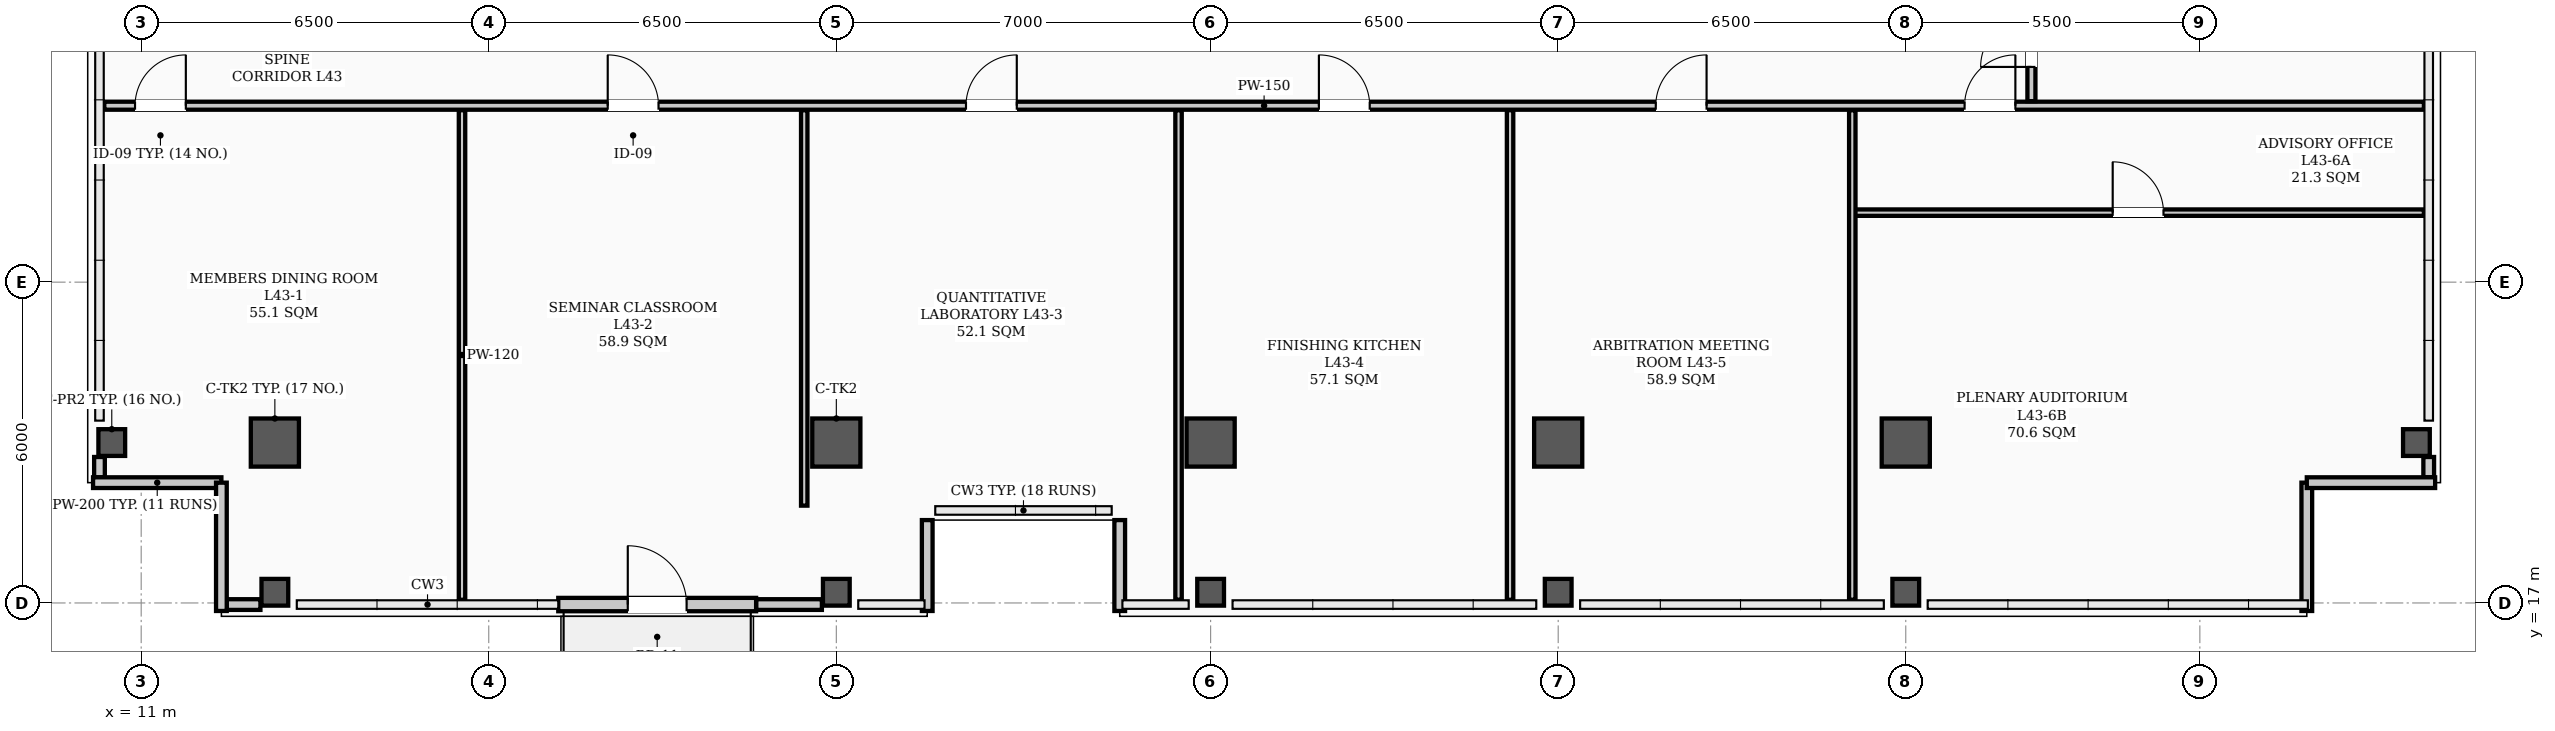
"""IFC4 building model, lengths in metres.
Left out: names, types, materials, properties, quantities, classifications, styles, units other than length and angle.
Written with IfcOpenShell. Run it as: python <this file> out.ifc"""

import sys

from ifc_helpers import new_model, si_unit, direction, frame, frame_2d, origin, origin_2d, place, context, subcontext, project, spatial, rectangle, hollow_rectangle, extrude, element, fill, save


model = new_model("IFC4")
c1 = context("Model", 3, precision=1e-05, world=origin(), true_north=direction((0.0, 1.0)))
c2 = subcontext(c1, "Body", "Model", "MODEL_VIEW")
j1 = project(units=[si_unit("LENGTHUNIT", "METRE"), si_unit("PLANEANGLEUNIT", "RADIAN")], contexts=[c1])
p1 = place(None, origin())
s1 = spatial("IfcSite", under=j1, at=p1, CompositionType="ELEMENT")
p2 = place(p1, origin())
s2 = spatial("IfcBuilding", under=s1, at=p2, CompositionType="ELEMENT")
p3 = place(p2, frame((0.0, 0.0, 173.4)))
s3 = spatial("IfcBuildingStorey", under=s2, at=p3, CompositionType="ELEMENT", Elevation=173.4)
for number, where, z_axis, x_axis in (
    (1, (13.5, 20.0, 0.0), (0.0, 0.0, 1.0), (1.0, 0.0, 0.0)),
    (2, (24.0, 20.0, 0.0), (0.0, 0.0, 1.0), (1.0, 0.0, 0.0)),
    (3, (31.0, 20.0, 0.0), (0.0, 0.0, 1.0), (1.0, 0.0, 0.0)),
    (4, (37.5, 20.0, 0.0), (0.0, 0.0, 1.0), (1.0, 0.0, 0.0)),
    (5, (44.0, 20.0, 0.0), (0.0, 0.0, 1.0), (1.0, 0.0, 0.0)),
):
    element("IfcColumn", number, at=place(p3, frame(where, z_axis=z_axis, x_axis=x_axis)), inside=s3, PredefinedType="COLUMN", context=c2, shape_type="SweptSolid", body=[
        extrude(hollow_rectangle(XDim=0.9, YDim=0.9, WallThickness=0.035, InnerFilletRadius=0.017, OuterFilletRadius=0.052, at=origin_2d()), origin(), (0.0, 0.0, 1.0), 3.9),
    ])
for number, where, z_axis, x_axis in (
    (6, (10.45, 20.0, 0.0), (0.0, 0.0, 1.0), (1.0, 0.0, 0.0)),
    (7, (13.5, 17.2, 0.0), (0.0, 0.0, 1.0), (1.0, 0.0, 0.0)),
    (8, (24.0, 17.2, 0.0), (0.0, 0.0, 1.0), (1.0, 0.0, 0.0)),
    (9, (31.0, 17.2, 0.0), (0.0, 0.0, 1.0), (1.0, 0.0, 0.0)),
    (10, (37.5, 17.2, 0.0), (0.0, 0.0, 1.0), (1.0, 0.0, 0.0)),
    (11, (44.0, 17.2, 0.0), (0.0, 0.0, 1.0), (1.0, 0.0, 0.0)),
    (12, (53.55, 20.0, 0.0), (0.0, 0.0, 1.0), (1.0, 0.0, 0.0)),
):
    element("IfcColumn", number, at=place(p3, frame(where, z_axis=z_axis, x_axis=x_axis)), inside=s3, PredefinedType="COLUMN", context=c2, shape_type="SweptSolid", body=[
        extrude(hollow_rectangle(XDim=0.5, YDim=0.5, WallThickness=0.024, InnerFilletRadius=0.012, OuterFilletRadius=0.036, at=origin_2d()), origin(), (0.0, 0.0, 1.0), 3.9),
    ])
for number, where, z_axis, x_axis in (
    (13, (10.22, 19.35, 0.0), (0.0, 0.0, 1.0), (0.0, 1.0, 0.0)),
    (14, (53.78, 19.35, 0.0), (0.0, 0.0, 1.0), (0.0, 1.0, 0.0)),
):
    element("IfcWall", number, at=place(p3, frame(where, z_axis=z_axis, x_axis=x_axis)), inside=s3, PredefinedType="PARAPET", context=c2, shape_type="SweptSolid", body=[
        extrude(rectangle(XDim=0.38, YDim=0.2, at=frame_2d((0.19, 0.0))), origin(), (0.0, 0.0, 1.0), 1.2),
    ])
p4 = place(p3, frame((12.6, 16.97, 0.0), z_axis=(0.0, 0.0, 1.0), x_axis=(1.0, 0.0, 0.0)))
e15 = element("IfcWall", 15, at=p4, inside=s3, PredefinedType="PARAPET", context=c2, shape_type="SweptSolid", body=[
    extrude(rectangle(XDim=0.63, YDim=0.2, at=frame_2d((0.315, 0.0))), origin(), (0.0, 0.0, 1.0), 1.2),
])
p5 = place(p3, frame((22.5, 16.97, 0.0), z_axis=(0.0, 0.0, 1.0), x_axis=(1.0, 0.0, 0.0)))
e16 = element("IfcWall", 16, at=p5, inside=s3, PredefinedType="PARAPET", context=c2, shape_type="SweptSolid", body=[
    extrude(rectangle(XDim=1.23, YDim=0.2, at=frame_2d((0.615, 0.0))), origin(), (0.0, 0.0, 1.0), 1.2),
])
for number, where, z_axis, x_axis in (
    (17, (10.1, 19.25, 0.0), (0.0, 0.0, 1.0), (1.0, 0.0, 0.0)),
    (18, (12.5, 19.25, 0.0), (0.0, 0.0, 1.0), (0.0, -1.0, 0.0)),
    (19, (51.5, 16.85, 0.0), (0.0, 0.0, 1.0), (0.0, 1.0, 0.0)),
    (20, (51.5, 19.25, 0.0), (0.0, 0.0, 1.0), (1.0, 0.0, 0.0)),
):
    element("IfcWall", number, at=place(p3, frame(where, z_axis=z_axis, x_axis=x_axis)), inside=s3, PredefinedType="PARAPET", context=c2, shape_type="SweptSolid", body=[
        extrude(rectangle(XDim=2.4, YDim=0.2, at=frame_2d((1.2, 0.0))), origin(), (0.0, 0.0, 1.0), 1.2),
    ])
for number, where, z_axis, x_axis in (
    (21, (25.7, 16.85, 0.0), (0.0, 0.0, 1.0), (0.0, 1.0, 0.0)),
    (22, (29.3, 18.55, 0.0), (0.0, 0.0, 1.0), (0.0, -1.0, 0.0)),
):
    element("IfcWall", number, at=place(p3, frame(where, z_axis=z_axis, x_axis=x_axis)), inside=s3, PredefinedType="PARAPET", context=c2, shape_type="SweptSolid", body=[
        extrude(rectangle(XDim=1.7, YDim=0.2, at=frame_2d((0.85, 0.0))), origin(), (0.0, 0.0, 1.0), 1.2),
    ])
p6 = place(p3, frame((18.8, 16.97, 0.0), z_axis=(0.0, 0.0, 1.0), x_axis=(1.0, 0.0, 0.0)))
e23 = element("IfcWall", 23, at=p6, inside=s3, PredefinedType="STANDARD", context=c2, shape_type="SweptSolid", body=[
    extrude(rectangle(XDim=3.7, YDim=0.25, at=frame_2d((1.85, 0.0))), origin(), (0.0, 0.0, 1.0), 3.18),
])
p7 = place(p6, frame((1.3, 0.0, 0.0)))
e24 = element("IfcOpeningElement", 24, at=p7, cuts=e23, PredefinedType="OPENING", context=c2, shape_type="SweptSolid", body=[
    extrude(rectangle(XDim=1.1, YDim=2.2, at=frame_2d((0.55, 1.1))), frame((0.0, 0.135, 0.0), z_axis=(0.0, -1.0, 0.0), x_axis=(1.0, 0.0, 0.0)), (0.0, 0.0, 1.0), 0.27),
])
p8 = place(p3, frame((10.31, 26.3, 0.0), z_axis=(0.0, 0.0, 1.0), x_axis=(1.0, 0.0, 0.0)))
e25 = element("IfcWall", 25, at=p8, inside=s3, PredefinedType="PARTITIONING", context=c2, shape_type="SweptSolid", body=[
    extrude(rectangle(XDim=43.38, YDim=0.15, at=frame_2d((21.69, 0.0))), origin(), (0.0, 0.0, 1.0), 3.2),
])
p9 = place(p8, frame((0.575, 0.0, 0.0)))
e26 = element("IfcOpeningElement", 26, at=p9, cuts=e25, PredefinedType="OPENING", context=c2, shape_type="SweptSolid", body=[
    extrude(rectangle(XDim=0.95, YDim=2.08, at=frame_2d((0.475, 1.04))), frame((0.0, 0.085, 0.0), z_axis=(0.0, -1.0, 0.0), x_axis=(1.0, 0.0, 0.0)), (0.0, 0.0, 1.0), 0.17),
])
p10 = place(p8, frame((9.415, 0.0, 0.0)))
e27 = element("IfcOpeningElement", 27, at=p10, cuts=e25, PredefinedType="OPENING", context=c2, shape_type="SweptSolid", body=[
    extrude(rectangle(XDim=0.95, YDim=2.08, at=frame_2d((0.475, 1.04))), frame((0.0, 0.085, 0.0), z_axis=(0.0, -1.0, 0.0), x_axis=(1.0, 0.0, 0.0)), (0.0, 0.0, 1.0), 0.17),
])
p11 = place(p8, frame((16.115, 0.0, 0.0)))
e28 = element("IfcOpeningElement", 28, at=p11, cuts=e25, PredefinedType="OPENING", context=c2, shape_type="SweptSolid", body=[
    extrude(rectangle(XDim=0.95, YDim=2.08, at=frame_2d((0.475, 1.04))), frame((0.0, 0.085, 0.0), z_axis=(0.0, -1.0, 0.0), x_axis=(1.0, 0.0, 0.0)), (0.0, 0.0, 1.0), 0.17),
])
p12 = place(p8, frame((22.715, 0.0, 0.0)))
e29 = element("IfcOpeningElement", 29, at=p12, cuts=e25, PredefinedType="OPENING", context=c2, shape_type="SweptSolid", body=[
    extrude(rectangle(XDim=0.95, YDim=2.08, at=frame_2d((0.475, 1.04))), frame((0.0, 0.085, 0.0), z_axis=(0.0, -1.0, 0.0), x_axis=(1.0, 0.0, 0.0)), (0.0, 0.0, 1.0), 0.17),
])
p13 = place(p8, frame((29.015, 0.0, 0.0)))
e30 = element("IfcOpeningElement", 30, at=p13, cuts=e25, PredefinedType="OPENING", context=c2, shape_type="SweptSolid", body=[
    extrude(rectangle(XDim=0.95, YDim=2.08, at=frame_2d((0.475, 1.04))), frame((0.0, 0.085, 0.0), z_axis=(0.0, -1.0, 0.0), x_axis=(1.0, 0.0, 0.0)), (0.0, 0.0, 1.0), 0.17),
])
p14 = place(p8, frame((34.79, 0.0, 0.0)))
e31 = element("IfcOpeningElement", 31, at=p14, cuts=e25, PredefinedType="OPENING", context=c2, shape_type="SweptSolid", body=[
    extrude(rectangle(XDim=0.95, YDim=2.08, at=frame_2d((0.475, 1.04))), frame((0.0, 0.085, 0.0), z_axis=(0.0, -1.0, 0.0), x_axis=(1.0, 0.0, 0.0)), (0.0, 0.0, 1.0), 0.17),
])
p15 = place(p3, frame((43.0, 24.3, 0.0), z_axis=(0.0, 0.0, 1.0), x_axis=(1.0, 0.0, 0.0)))
e32 = element("IfcWall", 32, at=p15, inside=s3, PredefinedType="PARTITIONING", context=c2, shape_type="SweptSolid", body=[
    extrude(rectangle(XDim=10.69, YDim=0.12, at=frame_2d((5.345, 0.0))), origin(), (0.0, 0.0, 1.0), 3.2),
])
p16 = place(p15, frame((4.87, 0.0, 0.0)))
e33 = element("IfcOpeningElement", 33, at=p16, cuts=e32, PredefinedType="OPENING", context=c2, shape_type="SweptSolid", body=[
    extrude(rectangle(XDim=0.95, YDim=2.08, at=frame_2d((0.475, 1.04))), frame((0.0, 0.07, 0.0), z_axis=(0.0, -1.0, 0.0), x_axis=(1.0, 0.0, 0.0)), (0.0, 0.0, 1.0), 0.14),
])
p17 = place(p3, frame((46.35, 26.385, 0.0), z_axis=(0.0, 0.0, 1.0), x_axis=(0.0, 1.0, 0.0)))
e34 = element("IfcWall", 34, at=p17, inside=s3, PredefinedType="PARTITIONING", context=c2, shape_type="SweptSolid", body=[
    extrude(rectangle(XDim=13.58, YDim=0.15, at=frame_2d((6.79, 0.0))), origin(), (0.0, 0.0, 1.0), 3.1),
])
p18 = place(p17, frame((0.64, 0.0, 0.0)))
e35 = element("IfcOpeningElement", 35, at=p18, cuts=e34, PredefinedType="OPENING", context=c2, shape_type="SweptSolid", body=[
    extrude(rectangle(XDim=0.95, YDim=2.08, at=frame_2d((0.475, 1.04))), frame((0.0, 0.085, 0.0), z_axis=(0.0, -1.0, 0.0), x_axis=(1.0, 0.0, 0.0)), (0.0, 0.0, 1.0), 0.17),
])
p19 = place(p17, frame((10.065, 0.0, 0.0)))
e36 = element("IfcOpeningElement", 36, at=p19, cuts=e34, PredefinedType="OPENING", context=c2, shape_type="SweptSolid", body=[
    extrude(rectangle(XDim=0.95, YDim=2.08, at=frame_2d((0.475, 1.04))), frame((0.0, 0.085, 0.0), z_axis=(0.0, -1.0, 0.0), x_axis=(1.0, 0.0, 0.0)), (0.0, 0.0, 1.0), 0.17),
])
p20 = place(p3, frame((17.0, 17.06, 0.0), z_axis=(0.0, 0.0, 1.0), x_axis=(0.0, 1.0, 0.0)))
e37 = element("IfcWall", 37, at=p20, inside=s3, PredefinedType="PARTITIONING", context=c2, shape_type="SweptSolid", body=[
    extrude(rectangle(XDim=9.155, YDim=0.12, at=frame_2d((4.578, 0.0))), origin(), (0.0, 0.0, 1.0), 3.1),
])
p21 = place(p3, frame((23.4, 18.82, 0.0), z_axis=(0.0, 0.0, 1.0), x_axis=(0.0, 1.0, 0.0)))
e38 = element("IfcWall", 38, at=p21, inside=s3, PredefinedType="PARTITIONING", context=c2, shape_type="SweptSolid", body=[
    extrude(rectangle(XDim=7.395, YDim=0.12, at=frame_2d((3.698, 0.0))), origin(), (0.0, 0.0, 1.0), 3.1),
])
for number, where, z_axis, x_axis in (
    (39, (30.4, 17.06, 0.0), (0.0, 0.0, 1.0), (0.0, 1.0, 0.0)),
    (40, (36.6, 17.06, 0.0), (0.0, 0.0, 1.0), (0.0, 1.0, 0.0)),
    (41, (43.0, 17.06, 0.0), (0.0, 0.0, 1.0), (0.0, 1.0, 0.0)),
):
    element("IfcWall", number, at=place(p3, frame(where, z_axis=z_axis, x_axis=x_axis)), inside=s3, PredefinedType="PARTITIONING", context=c2, shape_type="SweptSolid", body=[
        extrude(rectangle(XDim=9.155, YDim=0.12, at=frame_2d((4.578, 0.0))), origin(), (0.0, 0.0, 1.0), 3.1),
    ])
p22 = place(p7, origin())
e42 = element("IfcDoor", 42, at=p22, inside=s3, OperationType="SINGLE_SWING_LEFT", PredefinedType="DOOR", context=c2, shape_type="SweptSolid", body=[
    extrude(rectangle(XDim=1.1, YDim=2.2, at=frame_2d((0.55, 1.1))), frame((0.0, 0.025, 0.0), z_axis=(0.0, -1.0, 0.0), x_axis=(1.0, 0.0, 0.0)), (0.0, 0.0, 1.0), 0.05),
])
fill(e24, e42)
p23 = place(p9, origin())
e43 = element("IfcDoor", 43, at=p23, inside=s3, OperationType="SINGLE_SWING_RIGHT", PredefinedType="DOOR", context=c2, shape_type="SweptSolid", body=[
    extrude(rectangle(XDim=0.95, YDim=2.08, at=frame_2d((0.475, 1.04))), frame((0.0, 0.025, 0.0), z_axis=(0.0, -1.0, 0.0), x_axis=(1.0, 0.0, 0.0)), (0.0, 0.0, 1.0), 0.05),
])
fill(e26, e43)
p24 = place(p10, origin())
e44 = element("IfcDoor", 44, at=p24, inside=s3, OperationType="SINGLE_SWING_LEFT", PredefinedType="DOOR", context=c2, shape_type="SweptSolid", body=[
    extrude(rectangle(XDim=0.95, YDim=2.08, at=frame_2d((0.475, 1.04))), frame((0.0, 0.025, 0.0), z_axis=(0.0, -1.0, 0.0), x_axis=(1.0, 0.0, 0.0)), (0.0, 0.0, 1.0), 0.05),
])
fill(e27, e44)
p25 = place(p11, origin())
e45 = element("IfcDoor", 45, at=p25, inside=s3, OperationType="SINGLE_SWING_RIGHT", PredefinedType="DOOR", context=c2, shape_type="SweptSolid", body=[
    extrude(rectangle(XDim=0.95, YDim=2.08, at=frame_2d((0.475, 1.04))), frame((0.0, 0.025, 0.0), z_axis=(0.0, -1.0, 0.0), x_axis=(1.0, 0.0, 0.0)), (0.0, 0.0, 1.0), 0.05),
])
fill(e28, e45)
p26 = place(p12, origin())
e46 = element("IfcDoor", 46, at=p26, inside=s3, OperationType="SINGLE_SWING_LEFT", PredefinedType="DOOR", context=c2, shape_type="SweptSolid", body=[
    extrude(rectangle(XDim=0.95, YDim=2.08, at=frame_2d((0.475, 1.04))), frame((0.0, 0.025, 0.0), z_axis=(0.0, -1.0, 0.0), x_axis=(1.0, 0.0, 0.0)), (0.0, 0.0, 1.0), 0.05),
])
fill(e29, e46)
p27 = place(p13, origin())
e47 = element("IfcDoor", 47, at=p27, inside=s3, OperationType="SINGLE_SWING_RIGHT", PredefinedType="DOOR", context=c2, shape_type="SweptSolid", body=[
    extrude(rectangle(XDim=0.95, YDim=2.08, at=frame_2d((0.475, 1.04))), frame((0.0, 0.025, 0.0), z_axis=(0.0, -1.0, 0.0), x_axis=(1.0, 0.0, 0.0)), (0.0, 0.0, 1.0), 0.05),
])
fill(e30, e47)
p28 = place(p16, origin())
e48 = element("IfcDoor", 48, at=p28, inside=s3, OperationType="SINGLE_SWING_LEFT", PredefinedType="DOOR", context=c2, shape_type="SweptSolid", body=[
    extrude(rectangle(XDim=0.95, YDim=2.08, at=frame_2d((0.475, 1.04))), frame((0.0, 0.025, 0.0), z_axis=(0.0, -1.0, 0.0), x_axis=(1.0, 0.0, 0.0)), (0.0, 0.0, 1.0), 0.05),
])
fill(e33, e48)
p29 = place(p14, origin())
e49 = element("IfcDoor", 49, at=p29, inside=s3, OperationType="SINGLE_SWING_RIGHT", PredefinedType="DOOR", context=c2, shape_type="SweptSolid", body=[
    extrude(rectangle(XDim=0.95, YDim=2.08, at=frame_2d((0.475, 1.04))), frame((0.0, 0.025, 0.0), z_axis=(0.0, -1.0, 0.0), x_axis=(1.0, 0.0, 0.0)), (0.0, 0.0, 1.0), 0.05),
])
fill(e31, e49)
p30 = place(p18, origin())
e50 = element("IfcDoor", 50, at=p30, inside=s3, OperationType="SINGLE_SWING_LEFT", PredefinedType="DOOR", context=c2, shape_type="SweptSolid", body=[
    extrude(rectangle(XDim=0.95, YDim=2.08, at=frame_2d((0.475, 1.04))), frame((0.0, 0.025, 0.0), z_axis=(0.0, -1.0, 0.0), x_axis=(1.0, 0.0, 0.0)), (0.0, 0.0, 1.0), 0.05),
])
fill(e35, e50)
save(model, sys.argv[1])
